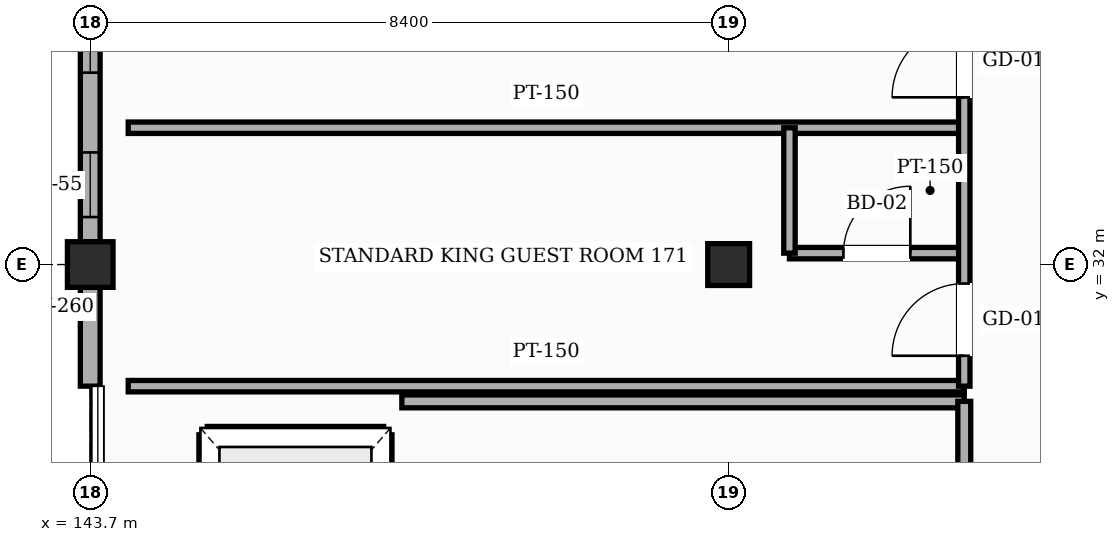
"""IFC4 building model, lengths in metres.
Left out: names, types, materials, properties, quantities, classifications, styles, units other than length and angle.
Written with IfcOpenShell. Run it as: python <this file> out.ifc"""

import sys

from ifc_helpers import new_model, si_unit, direction, frame, frame_2d, origin, origin_2d, place, context, subcontext, project, spatial, rectangle, hollow_rectangle, extrude, element, fill, save


model = new_model("IFC4")
c1 = context("Model", 3, precision=1e-05, world=origin(), true_north=direction((0.0, 1.0)))
c2 = subcontext(c1, "Body", "Model", "MODEL_VIEW")
j1 = project(units=[si_unit("LENGTHUNIT", "METRE"), si_unit("PLANEANGLEUNIT", "RADIAN")], contexts=[c1])
p1 = place(None, origin())
s1 = spatial("IfcSite", under=j1, at=p1, CompositionType="ELEMENT")
p2 = place(p1, origin())
s2 = spatial("IfcBuilding", under=s1, at=p2, CompositionType="ELEMENT")
p3 = place(p2, frame((0.0, 0.0, 31.8)))
s3 = spatial("IfcBuildingStorey", under=s2, at=p3, CompositionType="ELEMENT", Elevation=31.8)
p4 = place(p3, frame((143.7, 32.0, 0.0), z_axis=(0.0, 0.0, 1.0), x_axis=(1.0, 0.0, 0.0)))
e1 = element("IfcColumn", 1, at=p4, inside=s3, PredefinedType="COLUMN", context=c2, shape_type="SweptSolid", body=[
    extrude(hollow_rectangle(XDim=0.6, YDim=0.6, WallThickness=0.025, InnerFilletRadius=0.025, OuterFilletRadius=0.05, at=origin_2d()), origin(), (0.0, 0.0, 1.0), 3.6),
])
p5 = place(p3, frame((152.1, 32.0, 0.0), z_axis=(0.0, 0.0, 1.0), x_axis=(1.0, 0.0, 0.0)))
e2 = element("IfcColumn", 2, at=p5, inside=s3, PredefinedType="COLUMN", context=c2, shape_type="SweptSolid", body=[
    extrude(hollow_rectangle(XDim=0.55, YDim=0.55, WallThickness=0.022, InnerFilletRadius=0.022, OuterFilletRadius=0.044, at=origin_2d()), origin(), (0.0, 0.0, 1.0), 3.6),
])
p6 = place(p3, frame((143.7, 30.4, 0.0), z_axis=(0.0, 0.0, 1.0), x_axis=(0.0, 1.0, 0.0)))
e3 = element("IfcWall", 3, at=p6, inside=s3, PredefinedType="SOLIDWALL", context=c2, shape_type="SweptSolid", body=[
    extrude(rectangle(XDim=1.3, YDim=0.26, at=frame_2d((0.65, 0.0))), origin(), (0.0, 0.0, 1.0), 2.805),
])
p7 = place(p3, frame((143.7, 32.3, 0.0), z_axis=(0.0, 0.0, 1.0), x_axis=(0.0, 1.0, 0.0)))
e4 = element("IfcWall", 4, at=p7, inside=s3, PredefinedType="SOLIDWALL", context=c2, shape_type="SweptSolid", body=[
    extrude(rectangle(XDim=8.3, YDim=0.26, at=frame_2d((4.15, 0.0))), origin(), (0.0, 0.0, 1.0), 2.655),
])
p8 = place(p7, frame((0.325, 0.0, 0.85)))
e5 = element("IfcOpeningElement", 5, at=p8, cuts=e4, PredefinedType="OPENING", context=c2, shape_type="SweptSolid", body=[
    extrude(rectangle(XDim=0.85, YDim=1.35, at=frame_2d((0.425, 0.675))), frame((0.0, 0.14, 0.0), z_axis=(0.0, -1.0, 0.0), x_axis=(1.0, 0.0, 0.0)), (0.0, 0.0, 1.0), 0.28),
])
p9 = place(p7, frame((2.225, 0.0, 0.85)))
e6 = element("IfcOpeningElement", 6, at=p9, cuts=e4, PredefinedType="OPENING", context=c2, shape_type="SweptSolid", body=[
    extrude(rectangle(XDim=1.95, YDim=1.35, at=frame_2d((0.975, 0.675))), frame((0.0, 0.14, 0.0), z_axis=(0.0, -1.0, 0.0), x_axis=(1.0, 0.0, 0.0)), (0.0, 0.0, 1.0), 0.28),
])
p10 = place(p7, frame((5.475, 0.0, 0.85)))
e7 = element("IfcOpeningElement", 7, at=p10, cuts=e4, PredefinedType="OPENING", context=c2, shape_type="SweptSolid", body=[
    extrude(rectangle(XDim=2.25, YDim=1.35, at=frame_2d((1.125, 0.675))), frame((0.0, 0.14, 0.0), z_axis=(0.0, -1.0, 0.0), x_axis=(1.0, 0.0, 0.0)), (0.0, 0.0, 1.0), 0.28),
])
p11 = place(p3, frame((145.24, 29.76, 0.0), z_axis=(0.0, 0.0, 1.0), x_axis=(1.0, 0.0, 0.0)))
e8 = element("IfcWall", 8, at=p11, inside=s3, PredefinedType="SHEAR", context=c2, shape_type="SweptSolid", body=[
    extrude(rectangle(XDim=2.32, YDim=0.22, at=frame_2d((1.16, 0.0))), origin(), (0.0, 0.0, 1.0), 3.38),
])
p12 = place(p3, frame((147.56, 27.04, 0.0), z_axis=(0.0, 0.0, 1.0), x_axis=(0.0, 1.0, 0.0)))
e9 = element("IfcWall", 9, at=p12, inside=s3, PredefinedType="SHEAR", context=c2, shape_type="SweptSolid", body=[
    extrude(rectangle(XDim=2.72, YDim=0.22, at=frame_2d((1.36, 0.0))), origin(), (0.0, 0.0, 1.0), 3.38),
])
p13 = place(p12, frame((0.635, 0.0, 0.0)))
e10 = element("IfcOpeningElement", 10, at=p13, cuts=e9, PredefinedType="OPENING", context=c2, shape_type="SweptSolid", body=[
    extrude(rectangle(XDim=1.45, YDim=2.35, at=frame_2d((0.725, 1.175))), frame((0.0, 0.12, 0.0), z_axis=(0.0, -1.0, 0.0), x_axis=(1.0, 0.0, 0.0)), (0.0, 0.0, 1.0), 0.24),
])
p14 = place(p3, frame((145.24, 27.04, 0.0), z_axis=(0.0, 0.0, 1.0), x_axis=(0.0, 1.0, 0.0)))
e11 = element("IfcWall", 11, at=p14, inside=s3, PredefinedType="SHEAR", context=c2, shape_type="SweptSolid", body=[
    extrude(rectangle(XDim=2.72, YDim=0.22, at=frame_2d((1.36, 0.0))), origin(), (0.0, 0.0, 1.0), 3.38),
])
p15 = place(p3, frame((147.8, 30.2, 0.0), z_axis=(0.0, 0.0, 1.0), x_axis=(1.0, 0.0, 0.0)))
e12 = element("IfcWall", 12, at=p15, inside=s3, PredefinedType="PARTITIONING", context=c2, shape_type="SweptSolid", body=[
    extrude(rectangle(XDim=7.4, YDim=0.17, at=frame_2d((3.7, 0.0))), origin(), (0.0, 0.0, 1.0), 3.365),
])
p16 = place(p3, frame((144.2, 30.4, 0.0), z_axis=(0.0, 0.0, 1.0), x_axis=(1.0, 0.0, 0.0)))
e13 = element("IfcWall", 13, at=p16, inside=s3, PredefinedType="PARTITIONING", context=c2, shape_type="SweptSolid", body=[
    extrude(rectangle(XDim=11.0, YDim=0.15, at=frame_2d((5.5, 0.0))), origin(), (0.0, 0.0, 1.0), 3.365),
])
p17 = place(p3, frame((152.9, 32.15, 0.0), z_axis=(0.0, 0.0, 1.0), x_axis=(1.0, 0.0, 0.0)))
e14 = element("IfcWall", 14, at=p17, inside=s3, PredefinedType="PARTITIONING", context=c2, shape_type="SweptSolid", body=[
    extrude(rectangle(XDim=2.3, YDim=0.15, at=frame_2d((1.15, 0.0))), origin(), (0.0, 0.0, 1.0), 2.755),
])
p18 = place(p17, frame((0.71, 0.0, 0.0)))
e15 = element("IfcOpeningElement", 15, at=p18, cuts=e14, PredefinedType="OPENING", context=c2, shape_type="SweptSolid", body=[
    extrude(rectangle(XDim=0.88, YDim=2.12, at=frame_2d((0.44, 1.06))), frame((0.0, 0.085, 0.0), z_axis=(0.0, -1.0, 0.0), x_axis=(1.0, 0.0, 0.0)), (0.0, 0.0, 1.0), 0.17),
])
p19 = place(p3, frame((144.2, 33.8, 0.0), z_axis=(0.0, 0.0, 1.0), x_axis=(1.0, 0.0, 0.0)))
e16 = element("IfcWall", 16, at=p19, inside=s3, PredefinedType="PARTITIONING", context=c2, shape_type="SweptSolid", body=[
    extrude(rectangle(XDim=11.0, YDim=0.15, at=frame_2d((5.5, 0.0))), origin(), (0.0, 0.0, 1.0), 3.365),
])
p20 = place(p3, frame((152.9, 32.15, 0.0), z_axis=(0.0, 0.0, 1.0), x_axis=(0.0, 1.0, 0.0)))
e17 = element("IfcWall", 17, at=p20, inside=s3, PredefinedType="PARTITIONING", context=c2, shape_type="SweptSolid", body=[
    extrude(rectangle(XDim=1.65, YDim=0.15, at=frame_2d((0.825, 0.0))), origin(), (0.0, 0.0, 1.0), 3.365),
])
p21 = place(p3, frame((155.2, 26.8, 0.0), z_axis=(0.0, 0.0, 1.0), x_axis=(0.0, 1.0, 0.0)))
e18 = element("IfcWall", 18, at=p21, inside=s3, PredefinedType="PARTITIONING", context=c2, shape_type="SweptSolid", body=[
    extrude(rectangle(XDim=3.4, YDim=0.17, at=frame_2d((1.7, 0.0))), origin(), (0.0, 0.0, 1.0), 3.365),
])
p22 = place(p21, frame((1.1, 0.0, 0.0)))
e19 = element("IfcOpeningElement", 19, at=p22, cuts=e18, PredefinedType="OPENING", context=c2, shape_type="SweptSolid", body=[
    extrude(rectangle(XDim=1.2, YDim=2.2, at=frame_2d((0.6, 1.1))), frame((0.0, 0.095, 0.0), z_axis=(0.0, -1.0, 0.0), x_axis=(1.0, 0.0, 0.0)), (0.0, 0.0, 1.0), 0.19),
])
p23 = place(p3, frame((155.2, 30.4, 0.0), z_axis=(0.0, 0.0, 1.0), x_axis=(0.0, 1.0, 0.0)))
e20 = element("IfcWall", 20, at=p23, inside=s3, PredefinedType="PARTITIONING", context=c2, shape_type="SweptSolid", body=[
    extrude(rectangle(XDim=10.2, YDim=0.15, at=frame_2d((5.1, 0.0))), origin(), (0.0, 0.0, 1.0), 3.365),
])
p24 = place(p23, frame((0.4, 0.0, 0.0)))
e21 = element("IfcOpeningElement", 21, at=p24, cuts=e20, PredefinedType="OPENING", context=c2, shape_type="SweptSolid", body=[
    extrude(rectangle(XDim=0.95, YDim=2.15, at=frame_2d((0.475, 1.075))), frame((0.0, 0.085, 0.0), z_axis=(0.0, -1.0, 0.0), x_axis=(1.0, 0.0, 0.0)), (0.0, 0.0, 1.0), 0.17),
])
p25 = place(p23, frame((3.8, 0.0, 0.0)))
e22 = element("IfcOpeningElement", 22, at=p25, cuts=e20, PredefinedType="OPENING", context=c2, shape_type="SweptSolid", body=[
    extrude(rectangle(XDim=0.95, YDim=2.15, at=frame_2d((0.475, 1.075))), frame((0.0, 0.085, 0.0), z_axis=(0.0, -1.0, 0.0), x_axis=(1.0, 0.0, 0.0)), (0.0, 0.0, 1.0), 0.17),
])
p26 = place(p23, frame((7.2, 0.0, 0.0)))
e23 = element("IfcOpeningElement", 23, at=p26, cuts=e20, PredefinedType="OPENING", context=c2, shape_type="SweptSolid", body=[
    extrude(rectangle(XDim=0.95, YDim=2.15, at=frame_2d((0.475, 1.075))), frame((0.0, 0.085, 0.0), z_axis=(0.0, -1.0, 0.0), x_axis=(1.0, 0.0, 0.0)), (0.0, 0.0, 1.0), 0.17),
])
p27 = place(p8, origin())
e24 = element("IfcWindow", 24, at=p27, inside=s3, PartitioningType="SINGLE_PANEL", PredefinedType="WINDOW", context=c2, shape_type="SweptSolid", body=[
    extrude(rectangle(XDim=0.85, YDim=1.35, at=frame_2d((0.425, 0.675))), frame((0.0, 0.03, 0.0), z_axis=(0.0, -1.0, 0.0), x_axis=(1.0, 0.0, 0.0)), (0.0, 0.0, 1.0), 0.06),
])
fill(e5, e24)
p28 = place(p9, origin())
e25 = element("IfcWindow", 25, at=p28, inside=s3, PartitioningType="SINGLE_PANEL", PredefinedType="WINDOW", context=c2, shape_type="SweptSolid", body=[
    extrude(rectangle(XDim=1.95, YDim=1.35, at=frame_2d((0.975, 0.675))), frame((0.0, 0.03, 0.0), z_axis=(0.0, -1.0, 0.0), x_axis=(1.0, 0.0, 0.0)), (0.0, 0.0, 1.0), 0.06),
])
fill(e6, e25)
p29 = place(p24, origin())
e26 = element("IfcDoor", 26, at=p29, inside=s3, OperationType="SINGLE_SWING_LEFT", PredefinedType="DOOR", context=c2, shape_type="SweptSolid", body=[
    extrude(rectangle(XDim=0.95, YDim=2.15, at=frame_2d((0.475, 1.075))), frame((0.0, 0.025, 0.0), z_axis=(0.0, -1.0, 0.0), x_axis=(1.0, 0.0, 0.0)), (0.0, 0.0, 1.0), 0.05),
])
fill(e21, e26)
p30 = place(p18, origin())
e27 = element("IfcDoor", 27, at=p30, inside=s3, OperationType="SINGLE_SWING_RIGHT", PredefinedType="DOOR", context=c2, shape_type="SweptSolid", body=[
    extrude(rectangle(XDim=0.88, YDim=2.12, at=frame_2d((0.44, 1.06))), frame((0.0, 0.025, 0.0), z_axis=(0.0, -1.0, 0.0), x_axis=(1.0, 0.0, 0.0)), (0.0, 0.0, 1.0), 0.05),
])
fill(e15, e27)
p31 = place(p25, origin())
e28 = element("IfcDoor", 28, at=p31, inside=s3, OperationType="SINGLE_SWING_LEFT", PredefinedType="DOOR", context=c2, shape_type="SweptSolid", body=[
    extrude(rectangle(XDim=0.95, YDim=2.15, at=frame_2d((0.475, 1.075))), frame((0.0, 0.025, 0.0), z_axis=(0.0, -1.0, 0.0), x_axis=(1.0, 0.0, 0.0)), (0.0, 0.0, 1.0), 0.05),
])
fill(e22, e28)
save(model, sys.argv[1])
